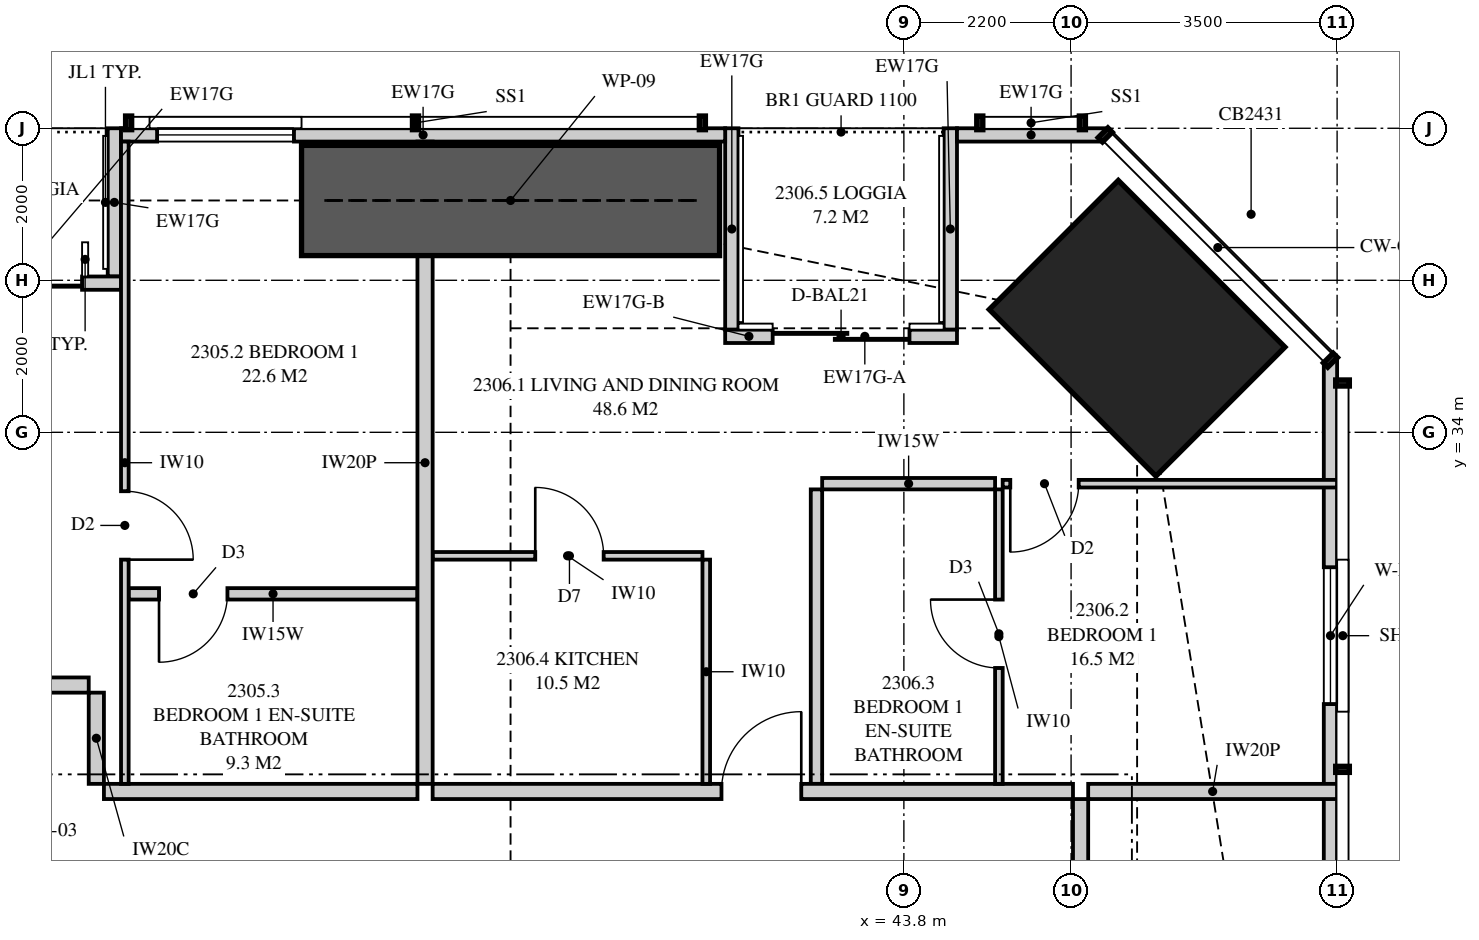
"""IFC4 building model, lengths in metres.
Left out: names, types, materials, properties, quantities, classifications, styles, units other than length and angle.
Written with IfcOpenShell. Run it as: python <this file> out.ifc"""

import sys

from ifc_helpers import new_model, si_unit, direction, frame, frame_2d, origin, origin_2d, place, context, subcontext, project, spatial, polyline, rectangle, hollow_rectangle, outline, extrude, element, fill, save


model = new_model("IFC4")
c1 = context("Model", 3, precision=1e-05, world=origin(), true_north=direction((0.0, 1.0)))
c2 = subcontext(c1, "Body", "Model", "MODEL_VIEW")
j1 = project(units=[si_unit("LENGTHUNIT", "METRE"), si_unit("PLANEANGLEUNIT", "RADIAN")], contexts=[c1])
p1 = place(None, origin())
s1 = spatial("IfcSite", under=j1, at=p1, CompositionType="ELEMENT")
p2 = place(p1, origin())
s2 = spatial("IfcBuilding", under=s1, at=p2, CompositionType="ELEMENT")
p3 = place(p2, frame((0.0, 0.0, 88.1)))
s3 = spatial("IfcBuildingStorey", under=s2, at=p3, CompositionType="ELEMENT", Elevation=88.1)
p4 = place(p3, frame((46.869, 35.369, 0.0), z_axis=(0.0, 0.0, 1.0), x_axis=(-0.707106781187, -0.707106781187, 0.0)))
e1 = element("IfcColumn", 1, at=p4, inside=s3, PredefinedType="COLUMN", context=c2, shape_type="SweptSolid", body=[
    extrude(hollow_rectangle(XDim=2.4, YDim=3.1, WallThickness=0.125, at=origin_2d()), origin(), (0.0, 0.0, 1.0), 3.35),
])
p5 = place(p3, frame((49.413, 3.051, 0.0), z_axis=(0.0, 0.0, 1.0), x_axis=(0.0, 1.0, 0.0)))
e2 = element("IfcWall", 2, at=p5, inside=s3, PredefinedType="SOLIDWALL", context=c2, shape_type="SweptSolid", body=[
    extrude(outline(polyline([(0.0, 0.0), (31.897, 0.0), (31.897, 3.11), (22.167, 3.11), (22.167, 2.15), (22.074, 2.15), (22.074, 3.11), (21.949, 3.11), (21.949, 2.15), (9.949, 2.15), (9.949, 3.11), (9.823, 3.11), (9.823, 2.15), (9.73, 2.15), (9.73, 3.11), (0.0, 3.11), (0.0, 0.0)])), frame((0.0, 0.087, 0.0), z_axis=(0.0, -1.0, 0.0), x_axis=(1.0, 0.0, 0.0)), (0.0, 0.0, 1.0), 0.175),
])
p6 = place(p5, frame((2.224, 0.0, 0.4)))
e3 = element("IfcOpeningElement", 3, at=p6, cuts=e2, PredefinedType="OPENING", context=c2, shape_type="SweptSolid", body=[
    extrude(rectangle(XDim=1.8, YDim=1.7, at=frame_2d((0.9, 0.85))), frame((0.0, 0.097, 0.0), z_axis=(0.0, -1.0, 0.0), x_axis=(1.0, 0.0, 0.0)), (0.0, 0.0, 1.0), 0.195),
])
p7 = place(p5, frame((14.849, 0.0, 0.4)))
e4 = element("IfcOpeningElement", 4, at=p7, cuts=e2, PredefinedType="OPENING", context=c2, shape_type="SweptSolid", body=[
    extrude(rectangle(XDim=1.2, YDim=1.7, at=frame_2d((0.6, 0.85))), frame((0.0, 0.097, 0.0), z_axis=(0.0, -1.0, 0.0), x_axis=(1.0, 0.0, 0.0)), (0.0, 0.0, 1.0), 0.195),
])
p8 = place(p5, frame((27.373, 0.0, 0.4)))
e5 = element("IfcOpeningElement", 5, at=p8, cuts=e2, PredefinedType="OPENING", context=c2, shape_type="SweptSolid", body=[
    extrude(rectangle(XDim=1.8, YDim=1.7, at=frame_2d((0.9, 0.85))), frame((0.0, 0.097, 0.0), z_axis=(0.0, -1.0, 0.0), x_axis=(1.0, 0.0, 0.0)), (0.0, 0.0, 1.0), 0.195),
])
p9 = place(p3, frame((46.449, 37.913, 0.0), z_axis=(0.0, 0.0, 1.0), x_axis=(-1.0, 0.0, 0.0)))
e6 = element("IfcWall", 6, at=p9, inside=s3, PredefinedType="SOLIDWALL", context=c2, shape_type="SweptSolid", body=[
    extrude(rectangle(XDim=1.95, YDim=0.175, at=frame_2d((0.975, 0.0))), origin(), (0.0, 0.0, 1.0), 3.11),
])
p10 = place(p3, frame((41.449, 37.913, 0.0), z_axis=(0.0, 0.0, 1.0), x_axis=(-1.0, 0.0, 0.0)))
e7 = element("IfcWall", 7, at=p10, inside=s3, PredefinedType="SOLIDWALL", context=c2, shape_type="SweptSolid", body=[
    extrude(outline(polyline([(0.0, 0.0), (7.949, 0.0), (7.949, 2.15), (2.824, 2.15), (2.824, 3.11), (2.666, 3.11), (2.666, 2.15), (2.62, 2.15), (2.62, 3.11), (0.0, 3.11), (0.0, 0.0)])), frame((0.0, 0.087, 0.0), z_axis=(0.0, -1.0, 0.0), x_axis=(1.0, 0.0, 0.0)), (0.0, 0.0, 1.0), 0.175),
])
p11 = place(p10, frame((5.674, 0.0, 0.4)))
e8 = element("IfcOpeningElement", 8, at=p11, cuts=e7, PredefinedType="OPENING", context=c2, shape_type="SweptSolid", body=[
    extrude(rectangle(XDim=1.8, YDim=1.7, at=frame_2d((0.9, 0.85))), frame((0.0, 0.097, 0.0), z_axis=(0.0, -1.0, 0.0), x_axis=(1.0, 0.0, 0.0)), (0.0, 0.0, 1.0), 0.195),
])
p12 = place(p3, frame((44.499, 35.262, 0.0), z_axis=(0.0, 0.0, 1.0), x_axis=(-1.0, 0.0, 0.0)))
e9 = element("IfcWall", 9, at=p12, inside=s3, PredefinedType="SOLIDWALL", context=c2, shape_type="SweptSolid", body=[
    extrude(rectangle(XDim=2.425, YDim=0.175, at=frame_2d((1.212, 0.0))), origin(), (0.0, 0.0, 1.0), 2.15),
])
p13 = place(p12, frame((0.625, 0.0, 0.0)))
e10 = element("IfcOpeningElement", 10, at=p13, cuts=e9, PredefinedType="OPENING", context=c2, shape_type="SweptSolid", body=[
    extrude(rectangle(XDim=1.8, YDim=2.1, at=frame_2d((0.9, 1.05))), frame((0.0, 0.097, 0.0), z_axis=(0.0, -1.0, 0.0), x_axis=(1.0, 0.0, 0.0)), (0.0, 0.0, 1.0), 0.195),
])
p14 = place(p3, frame((42.074, 35.262, 0.0), z_axis=(0.0, 0.0, 1.0), x_axis=(-1.0, 0.0, 0.0)))
e11 = element("IfcWall", 11, at=p14, inside=s3, PredefinedType="SOLIDWALL", context=c2, shape_type="SweptSolid", body=[
    extrude(rectangle(XDim=0.625, YDim=0.175, at=frame_2d((0.312, 0.0))), origin(), (0.0, 0.0, 1.0), 2.51),
])
p15 = place(p3, frame((44.411, 38.0, 0.0), z_axis=(0.0, 0.0, 1.0), x_axis=(0.0, -1.0, 0.0)))
e12 = element("IfcWall", 12, at=p15, inside=s3, PredefinedType="SOLIDWALL", context=c2, shape_type="SweptSolid", body=[
    extrude(outline(polyline([(0.0, 0.0), (2.65, 0.0), (2.65, 2.15), (1.296, 2.15), (1.296, 3.11), (0.0, 3.11), (0.0, 0.0)])), frame((0.0, 0.087, 0.0), z_axis=(0.0, -1.0, 0.0), x_axis=(1.0, 0.0, 0.0)), (0.0, 0.0, 1.0), 0.175),
])
p16 = place(p3, frame((41.536, 38.0, 0.0), z_axis=(0.0, 0.0, 1.0), x_axis=(0.0, -1.0, 0.0)))
e13 = element("IfcWall", 13, at=p16, inside=s3, PredefinedType="SOLIDWALL", context=c2, shape_type="SweptSolid", body=[
    extrude(outline(polyline([(0.0, 0.0), (2.65, 0.0), (2.65, 2.51), (2.378, 2.51), (2.378, 2.15), (0.709, 2.15), (0.709, 3.11), (0.0, 3.11), (0.0, 0.0)])), frame((0.0, 0.087, 0.0), z_axis=(0.0, -1.0, 0.0), x_axis=(1.0, 0.0, 0.0)), (0.0, 0.0, 1.0), 0.175),
])
p17 = place(p3, frame((33.5, 35.962, 0.0), z_axis=(0.0, 0.0, 1.0), x_axis=(-1.0, 0.0, 0.0)))
e14 = element("IfcWall", 14, at=p17, inside=s3, PredefinedType="SOLIDWALL", context=c2, shape_type="SweptSolid", body=[
    extrude(rectangle(XDim=2.825, YDim=0.175, at=frame_2d((1.413, 0.0))), origin(), (0.0, 0.0, 1.0), 3.11),
])
p18 = place(p17, frame((0.512, 0.0, 0.0)))
e15 = element("IfcOpeningElement", 15, at=p18, cuts=e14, PredefinedType="OPENING", context=c2, shape_type="SweptSolid", body=[
    extrude(rectangle(XDim=1.8, YDim=2.1, at=frame_2d((0.9, 1.05))), frame((0.0, 0.097, 0.0), z_axis=(0.0, -1.0, 0.0), x_axis=(1.0, 0.0, 0.0)), (0.0, 0.0, 1.0), 0.195),
])
p19 = place(p3, frame((33.413, 38.0, 0.0), z_axis=(0.0, 0.0, 1.0), x_axis=(0.0, -1.0, 0.0)))
e16 = element("IfcWall", 16, at=p19, inside=s3, PredefinedType="SOLIDWALL", context=c2, shape_type="SweptSolid", body=[
    extrude(outline(polyline([(0.0, 0.0), (1.95, 0.0), (1.95, 3.11), (1.75, 3.11), (1.75, 2.15), (0.15, 2.15), (0.15, 3.11), (0.0, 3.11), (0.0, 0.0)])), frame((0.0, 0.087, 0.0), z_axis=(0.0, -1.0, 0.0), x_axis=(1.0, 0.0, 0.0)), (0.0, 0.0, 1.0), 0.175),
])
p20 = place(p3, frame((37.5, 37.825, 0.0), z_axis=(0.0, 0.0, 1.0), x_axis=(0.0, -1.0, 0.0)))
e17 = element("IfcWall", 17, at=p20, inside=s3, PredefinedType="PARTITIONING", context=c2, shape_type="SweptSolid", body=[
    extrude(outline(polyline([(0.526, 2.15), (0.0, 2.15), (0.0, 0.0), (0.526, 0.0), (0.526, 0.747), (1.024, 0.747), (1.024, 0.0), (8.45, 0.0), (8.45, 3.11), (1.685, 3.11), (1.685, 2.15), (1.024, 2.15), (1.024, 1.403), (0.526, 1.403), (0.526, 2.15)])), frame((0.0, 0.1, 0.0), z_axis=(0.0, -1.0, 0.0), x_axis=(1.0, 0.0, 0.0)), (0.0, 0.0, 1.0), 0.2),
])
p21 = place(p3, frame((33.55, 37.825, 0.0), z_axis=(0.0, 0.0, 1.0), x_axis=(0.0, -1.0, 0.0)))
e18 = element("IfcWall", 18, at=p21, inside=s3, PredefinedType="PARTITIONING", context=c2, shape_type="SweptSolid", body=[
    extrude(outline(polyline([(0.0, 0.0), (8.45, 0.0), (8.45, 3.11), (1.635, 3.11), (1.635, 2.15), (0.0, 2.15), (0.0, 3.11), (0.0, 0.0)])), frame((0.0, 0.05, 0.0), z_axis=(0.0, -1.0, 0.0), x_axis=(1.0, 0.0, 0.0)), (0.0, 0.0, 1.0), 0.1),
])
p22 = place(p21, frame((4.6, 0.0, 0.0)))
e19 = element("IfcOpeningElement", 19, at=p22, cuts=e18, PredefinedType="OPENING", context=c2, shape_type="SweptSolid", body=[
    extrude(rectangle(XDim=0.9, YDim=2.1, at=frame_2d((0.45, 1.05))), frame((0.0, 0.06, 0.0), z_axis=(0.0, -1.0, 0.0), x_axis=(1.0, 0.0, 0.0)), (0.0, 0.0, 1.0), 0.12),
])
p23 = place(p3, frame((33.6, 31.875, 0.0), z_axis=(0.0, 0.0, 1.0), x_axis=(1.0, 0.0, 0.0)))
e20 = element("IfcWall", 20, at=p23, inside=s3, PredefinedType="PLUMBINGWALL", context=c2, shape_type="SweptSolid", body=[
    extrude(rectangle(XDim=3.8, YDim=0.15, at=frame_2d((1.9, 0.0))), origin(), (0.0, 0.0, 1.0), 3.11),
])
p24 = place(p23, frame((0.4, 0.0, 0.0)))
e21 = element("IfcOpeningElement", 21, at=p24, cuts=e20, PredefinedType="OPENING", context=c2, shape_type="SweptSolid", body=[
    extrude(rectangle(XDim=0.9, YDim=2.1, at=frame_2d((0.45, 1.05))), frame((0.0, 0.085, 0.0), z_axis=(0.0, -1.0, 0.0), x_axis=(1.0, 0.0, 0.0)), (0.0, 0.0, 1.0), 0.17),
])
p25 = place(p3, frame((37.6, 29.275, 0.0), z_axis=(0.0, 0.0, 1.0), x_axis=(1.0, 0.0, 0.0)))
e22 = element("IfcWall", 22, at=p25, inside=s3, PredefinedType="PARTITIONING", context=c2, shape_type="SweptSolid", body=[
    extrude(outline(polyline([(0.0, 0.0), (8.425, 0.0), (8.425, 3.11), (1.371, 3.11), (1.371, 2.531), (0.679, 2.531), (0.679, 3.11), (0.0, 3.11), (0.0, 0.0)])), frame((0.0, 0.1, 0.0), z_axis=(0.0, -1.0, 0.0), x_axis=(1.0, 0.0, 0.0)), (0.0, 0.0, 1.0), 0.2),
])
p26 = place(p25, frame((3.8, 0.0, 0.0)))
e23 = element("IfcOpeningElement", 23, at=p26, cuts=e22, PredefinedType="OPENING", context=c2, shape_type="SweptSolid", body=[
    extrude(rectangle(XDim=1.05, YDim=2.2, at=frame_2d((0.525, 1.1))), frame((0.0, 0.11, 0.0), z_axis=(0.0, -1.0, 0.0), x_axis=(1.0, 0.0, 0.0)), (0.0, 0.0, 1.0), 0.22),
])
p27 = place(p3, frame((45.05, 33.249, 0.0), z_axis=(0.0, 0.0, 1.0), x_axis=(0.0, -1.0, 0.0)))
e24 = element("IfcWall", 24, at=p27, inside=s3, PredefinedType="PARTITIONING", context=c2, shape_type="SweptSolid", body=[
    extrude(rectangle(XDim=3.874, YDim=0.1, at=frame_2d((1.937, 0.0))), origin(), (0.0, 0.0, 1.0), 3.11),
])
p28 = place(p27, frame((1.45, 0.0, 0.0)))
e25 = element("IfcOpeningElement", 25, at=p28, cuts=e24, PredefinedType="OPENING", context=c2, shape_type="SweptSolid", body=[
    extrude(rectangle(XDim=0.9, YDim=2.1, at=frame_2d((0.45, 1.05))), frame((0.0, 0.06, 0.0), z_axis=(0.0, -1.0, 0.0), x_axis=(1.0, 0.0, 0.0)), (0.0, 0.0, 1.0), 0.12),
])
p29 = place(p3, frame((45.1, 33.324, 0.0), z_axis=(0.0, 0.0, 1.0), x_axis=(1.0, 0.0, 0.0)))
e26 = element("IfcWall", 26, at=p29, inside=s3, PredefinedType="PARTITIONING", context=c2, shape_type="SweptSolid", body=[
    extrude(outline(polyline([(0.0, 0.0), (4.4, 0.0), (4.4, 3.11), (2.971, 3.11), (2.971, 2.15), (1.229, 2.15), (1.229, 3.11), (0.0, 3.11), (0.0, 0.0)])), frame((0.0, 0.05, 0.0), z_axis=(0.0, -1.0, 0.0), x_axis=(1.0, 0.0, 0.0)), (0.0, 0.0, 1.0), 0.1),
])
p30 = place(p29, frame((0.1, 0.0, 0.0)))
e27 = element("IfcOpeningElement", 27, at=p30, cuts=e26, PredefinedType="OPENING", context=c2, shape_type="SweptSolid", body=[
    extrude(rectangle(XDim=0.9, YDim=2.1, at=frame_2d((0.45, 1.05))), frame((0.0, 0.06, 0.0), z_axis=(0.0, -1.0, 0.0), x_axis=(1.0, 0.0, 0.0)), (0.0, 0.0, 1.0), 0.12),
])
p31 = place(p3, frame((42.725, 33.324, 0.0), z_axis=(0.0, 0.0, 1.0), x_axis=(1.0, 0.0, 0.0)))
e28 = element("IfcWall", 28, at=p31, inside=s3, PredefinedType="PLUMBINGWALL", context=c2, shape_type="SweptSolid", body=[
    extrude(rectangle(XDim=2.275, YDim=0.15, at=frame_2d((1.137, 0.0))), origin(), (0.0, 0.0, 1.0), 3.11),
])
p32 = place(p3, frame((42.65, 33.249, 0.0), z_axis=(0.0, 0.0, 1.0), x_axis=(0.0, -1.0, 0.0)))
e29 = element("IfcWall", 29, at=p32, inside=s3, PredefinedType="PLUMBINGWALL", context=c2, shape_type="SweptSolid", body=[
    extrude(rectangle(XDim=3.874, YDim=0.15, at=frame_2d((1.937, 0.0))), origin(), (0.0, 0.0, 1.0), 3.11),
])
p33 = place(p3, frame((37.6, 32.375, 0.0), z_axis=(0.0, 0.0, 1.0), x_axis=(1.0, 0.0, 0.0)))
e30 = element("IfcWall", 30, at=p33, inside=s3, PredefinedType="PARTITIONING", context=c2, shape_type="SweptSolid", body=[
    extrude(outline(polyline([(0.0, 0.0), (3.55, 0.0), (3.55, 3.11), (1.321, 3.11), (1.321, 2.531), (0.729, 2.531), (0.729, 3.11), (0.0, 3.11), (0.0, 0.0)])), frame((0.0, 0.05, 0.0), z_axis=(0.0, -1.0, 0.0), x_axis=(1.0, 0.0, 0.0)), (0.0, 0.0, 1.0), 0.1),
])
p34 = place(p33, frame((1.35, 0.0, 0.0)))
e31 = element("IfcOpeningElement", 31, at=p34, cuts=e30, PredefinedType="OPENING", context=c2, shape_type="SweptSolid", body=[
    extrude(rectangle(XDim=0.9, YDim=2.1, at=frame_2d((0.45, 1.05))), frame((0.0, 0.06, 0.0), z_axis=(0.0, -1.0, 0.0), x_axis=(1.0, 0.0, 0.0)), (0.0, 0.0, 1.0), 0.12),
])
p35 = place(p3, frame((41.2, 32.325, 0.0), z_axis=(0.0, 0.0, 1.0), x_axis=(0.0, -1.0, 0.0)))
e32 = element("IfcWall", 32, at=p35, inside=s3, PredefinedType="PARTITIONING", context=c2, shape_type="SweptSolid", body=[
    extrude(rectangle(XDim=2.95, YDim=0.1, at=frame_2d((1.475, 0.0))), origin(), (0.0, 0.0, 1.0), 3.11),
])
p36 = place(p3, frame((46.225, 29.275, 0.0), z_axis=(0.0, 0.0, 1.0), x_axis=(1.0, 0.0, 0.0)))
e33 = element("IfcWall", 33, at=p36, inside=s3, PredefinedType="PARTITIONING", context=c2, shape_type="SweptSolid", body=[
    extrude(outline(polyline([(0.0, 0.0), (3.275, 0.0), (3.275, 3.11), (2.554, 3.11), (2.554, 2.15), (0.805, 2.15), (0.805, 2.531), (0.297, 2.531), (0.297, 3.11), (0.0, 3.11), (0.0, 0.0)])), frame((0.0, 0.1, 0.0), z_axis=(0.0, -1.0, 0.0), x_axis=(1.0, 0.0, 0.0)), (0.0, 0.0, 1.0), 0.2),
])
p37 = place(p3, frame((33.275, 29.275, 0.0), z_axis=(0.0, 0.0, 1.0), x_axis=(1.0, 0.0, 0.0)))
e34 = element("IfcWall", 34, at=p37, inside=s3, PredefinedType="PARTITIONING", context=c2, shape_type="SweptSolid", body=[
    extrude(rectangle(XDim=4.125, YDim=0.2, at=frame_2d((2.062, 0.0))), origin(), (0.0, 0.0, 1.0), 3.11),
])
p38 = place(p3, frame((30.675, 30.675, 0.0), z_axis=(0.0, 0.0, 1.0), x_axis=(1.0, 0.0, 0.0)))
e35 = element("IfcWall", 35, at=p38, inside=s3, PredefinedType="PARTITIONING", context=c2, shape_type="SweptSolid", body=[
    extrude(rectangle(XDim=2.4, YDim=0.2, at=frame_2d((1.2, 0.0))), origin(), (0.0, 0.0, 1.0), 3.11),
])
p39 = place(p38, frame((0.7, 0.0, 0.0)))
e36 = element("IfcOpeningElement", 36, at=p39, cuts=e35, PredefinedType="OPENING", context=c2, shape_type="SweptSolid", body=[
    extrude(rectangle(XDim=1.05, YDim=2.2, at=frame_2d((0.525, 1.1))), frame((0.0, 0.11, 0.0), z_axis=(0.0, -1.0, 0.0), x_axis=(1.0, 0.0, 0.0)), (0.0, 0.0, 1.0), 0.22),
])
p40 = place(p3, frame((33.175, 29.375, 0.0), z_axis=(0.0, 0.0, 1.0), x_axis=(0.0, 1.0, 0.0)))
e37 = element("IfcWall", 37, at=p40, inside=s3, PredefinedType="PARTITIONING", context=c2, shape_type="SweptSolid", body=[
    extrude(rectangle(XDim=1.2, YDim=0.2, at=frame_2d((0.6, 0.0))), origin(), (0.0, 0.0, 1.0), 3.11),
])
p41 = place(p3, frame((46.125, 20.7, 0.0), z_axis=(0.0, 0.0, 1.0), x_axis=(0.0, 1.0, 0.0)))
e38 = element("IfcWall", 38, at=p41, inside=s3, PredefinedType="PARTITIONING", context=c2, shape_type="SweptSolid", body=[
    extrude(outline(polyline([(0.0, 0.0), (8.475, 0.0), (8.475, 3.11), (4.646, 3.11), (4.646, 2.531), (3.954, 2.531), (3.954, 3.11), (0.0, 3.11), (0.0, 0.0)])), frame((0.0, 0.1, 0.0), z_axis=(0.0, -1.0, 0.0), x_axis=(1.0, 0.0, 0.0)), (0.0, 0.0, 1.0), 0.2),
])
p42 = place(p41, frame((6.625, 0.0, 0.0)))
e39 = element("IfcOpeningElement", 39, at=p42, cuts=e38, PredefinedType="OPENING", context=c2, shape_type="SweptSolid", body=[
    extrude(rectangle(XDim=1.0, YDim=2.1, at=frame_2d((0.5, 1.05))), frame((0.0, 0.11, 0.0), z_axis=(0.0, -1.0, 0.0), x_axis=(1.0, 0.0, 0.0)), (0.0, 0.0, 1.0), 0.22),
])
p43 = place(p3, frame((35.875, 37.05, 0.0), z_axis=(0.0, 0.0, 1.0), x_axis=(1.0, 0.0, 0.0)))
e40 = element("IfcWall", 40, at=p43, inside=s3, PredefinedType="SHEAR", context=c2, shape_type="SweptSolid", body=[
    extrude(rectangle(XDim=5.5, YDim=1.45, at=frame_2d((2.75, 0.0))), origin(), (0.0, 0.0, 1.0), 3.35),
])
p44 = place(p8, origin())
e41 = element("IfcWindow", 41, at=p44, inside=s3, PartitioningType="SINGLE_PANEL", PredefinedType="WINDOW", context=c2, shape_type="SweptSolid", body=[
    extrude(rectangle(XDim=1.8, YDim=1.7, at=frame_2d((0.9, 0.85))), frame((0.0, 0.03, 0.0), z_axis=(0.0, -1.0, 0.0), x_axis=(1.0, 0.0, 0.0)), (0.0, 0.0, 1.0), 0.06),
])
fill(e5, e41)
p45 = place(p13, origin())
e42 = element("IfcDoor", 42, at=p45, inside=s3, OperationType="SLIDING_TO_LEFT", PredefinedType="DOOR", context=c2, shape_type="SweptSolid", body=[
    extrude(rectangle(XDim=1.8, YDim=2.1, at=frame_2d((0.9, 1.05))), frame((0.0, 0.025, 0.0), z_axis=(0.0, -1.0, 0.0), x_axis=(1.0, 0.0, 0.0)), (0.0, 0.0, 1.0), 0.05),
])
fill(e10, e42)
p46 = place(p11, origin())
e43 = element("IfcWindow", 43, at=p46, inside=s3, PartitioningType="SINGLE_PANEL", PredefinedType="WINDOW", context=c2, shape_type="SweptSolid", body=[
    extrude(rectangle(XDim=1.8, YDim=1.7, at=frame_2d((0.9, 0.85))), frame((0.0, 0.03, 0.0), z_axis=(0.0, -1.0, 0.0), x_axis=(1.0, 0.0, 0.0)), (0.0, 0.0, 1.0), 0.06),
])
fill(e8, e43)
p47 = place(p18, origin())
e44 = element("IfcDoor", 44, at=p47, inside=s3, OperationType="SLIDING_TO_LEFT", PredefinedType="DOOR", context=c2, shape_type="SweptSolid", body=[
    extrude(rectangle(XDim=1.8, YDim=2.1, at=frame_2d((0.9, 1.05))), frame((0.0, 0.025, 0.0), z_axis=(0.0, -1.0, 0.0), x_axis=(1.0, 0.0, 0.0)), (0.0, 0.0, 1.0), 0.05),
])
fill(e15, e44)
p48 = place(p22, origin())
e45 = element("IfcDoor", 45, at=p48, inside=s3, OperationType="SINGLE_SWING_RIGHT", PredefinedType="DOOR", context=c2, shape_type="SweptSolid", body=[
    extrude(rectangle(XDim=0.9, YDim=2.1, at=frame_2d((0.45, 1.05))), frame((0.0, 0.025, 0.0), z_axis=(0.0, -1.0, 0.0), x_axis=(1.0, 0.0, 0.0)), (0.0, 0.0, 1.0), 0.05),
])
fill(e19, e45)
p49 = place(p24, frame((0.9, 0.0, 0.0), z_axis=(0.0, 0.0, 1.0), x_axis=(-1.0, 0.0, 0.0)))
e46 = element("IfcDoor", 46, at=p49, inside=s3, OperationType="SINGLE_SWING_RIGHT", PredefinedType="DOOR", context=c2, shape_type="SweptSolid", body=[
    extrude(rectangle(XDim=0.9, YDim=2.1, at=frame_2d((0.45, 1.05))), frame((0.0, 0.025, 0.0), z_axis=(0.0, -1.0, 0.0), x_axis=(1.0, 0.0, 0.0)), (0.0, 0.0, 1.0), 0.05),
])
fill(e21, e46)
p50 = place(p26, origin())
e47 = element("IfcDoor", 47, at=p50, inside=s3, OperationType="SINGLE_SWING_RIGHT", PredefinedType="DOOR", context=c2, shape_type="SweptSolid", body=[
    extrude(rectangle(XDim=1.05, YDim=2.2, at=frame_2d((0.525, 1.1))), frame((0.0, 0.025, 0.0), z_axis=(0.0, -1.0, 0.0), x_axis=(1.0, 0.0, 0.0)), (0.0, 0.0, 1.0), 0.05),
])
fill(e23, e47)
p51 = place(p30, frame((0.9, 0.0, 0.0), z_axis=(0.0, 0.0, 1.0), x_axis=(-1.0, 0.0, 0.0)))
e48 = element("IfcDoor", 48, at=p51, inside=s3, OperationType="SINGLE_SWING_RIGHT", PredefinedType="DOOR", context=c2, shape_type="SweptSolid", body=[
    extrude(rectangle(XDim=0.9, YDim=2.1, at=frame_2d((0.45, 1.05))), frame((0.0, 0.025, 0.0), z_axis=(0.0, -1.0, 0.0), x_axis=(1.0, 0.0, 0.0)), (0.0, 0.0, 1.0), 0.05),
])
fill(e27, e48)
p52 = place(p28, frame((0.9, 0.0, 0.0), z_axis=(0.0, 0.0, 1.0), x_axis=(-1.0, 0.0, 0.0)))
e49 = element("IfcDoor", 49, at=p52, inside=s3, OperationType="SINGLE_SWING_RIGHT", PredefinedType="DOOR", context=c2, shape_type="SweptSolid", body=[
    extrude(rectangle(XDim=0.9, YDim=2.1, at=frame_2d((0.45, 1.05))), frame((0.0, 0.025, 0.0), z_axis=(0.0, -1.0, 0.0), x_axis=(1.0, 0.0, 0.0)), (0.0, 0.0, 1.0), 0.05),
])
fill(e25, e49)
p53 = place(p34, origin())
e50 = element("IfcDoor", 50, at=p53, inside=s3, OperationType="SINGLE_SWING_LEFT", PredefinedType="DOOR", context=c2, shape_type="SweptSolid", body=[
    extrude(rectangle(XDim=0.9, YDim=2.1, at=frame_2d((0.45, 1.05))), frame((0.0, 0.025, 0.0), z_axis=(0.0, -1.0, 0.0), x_axis=(1.0, 0.0, 0.0)), (0.0, 0.0, 1.0), 0.05),
])
fill(e31, e50)
save(model, sys.argv[1])
